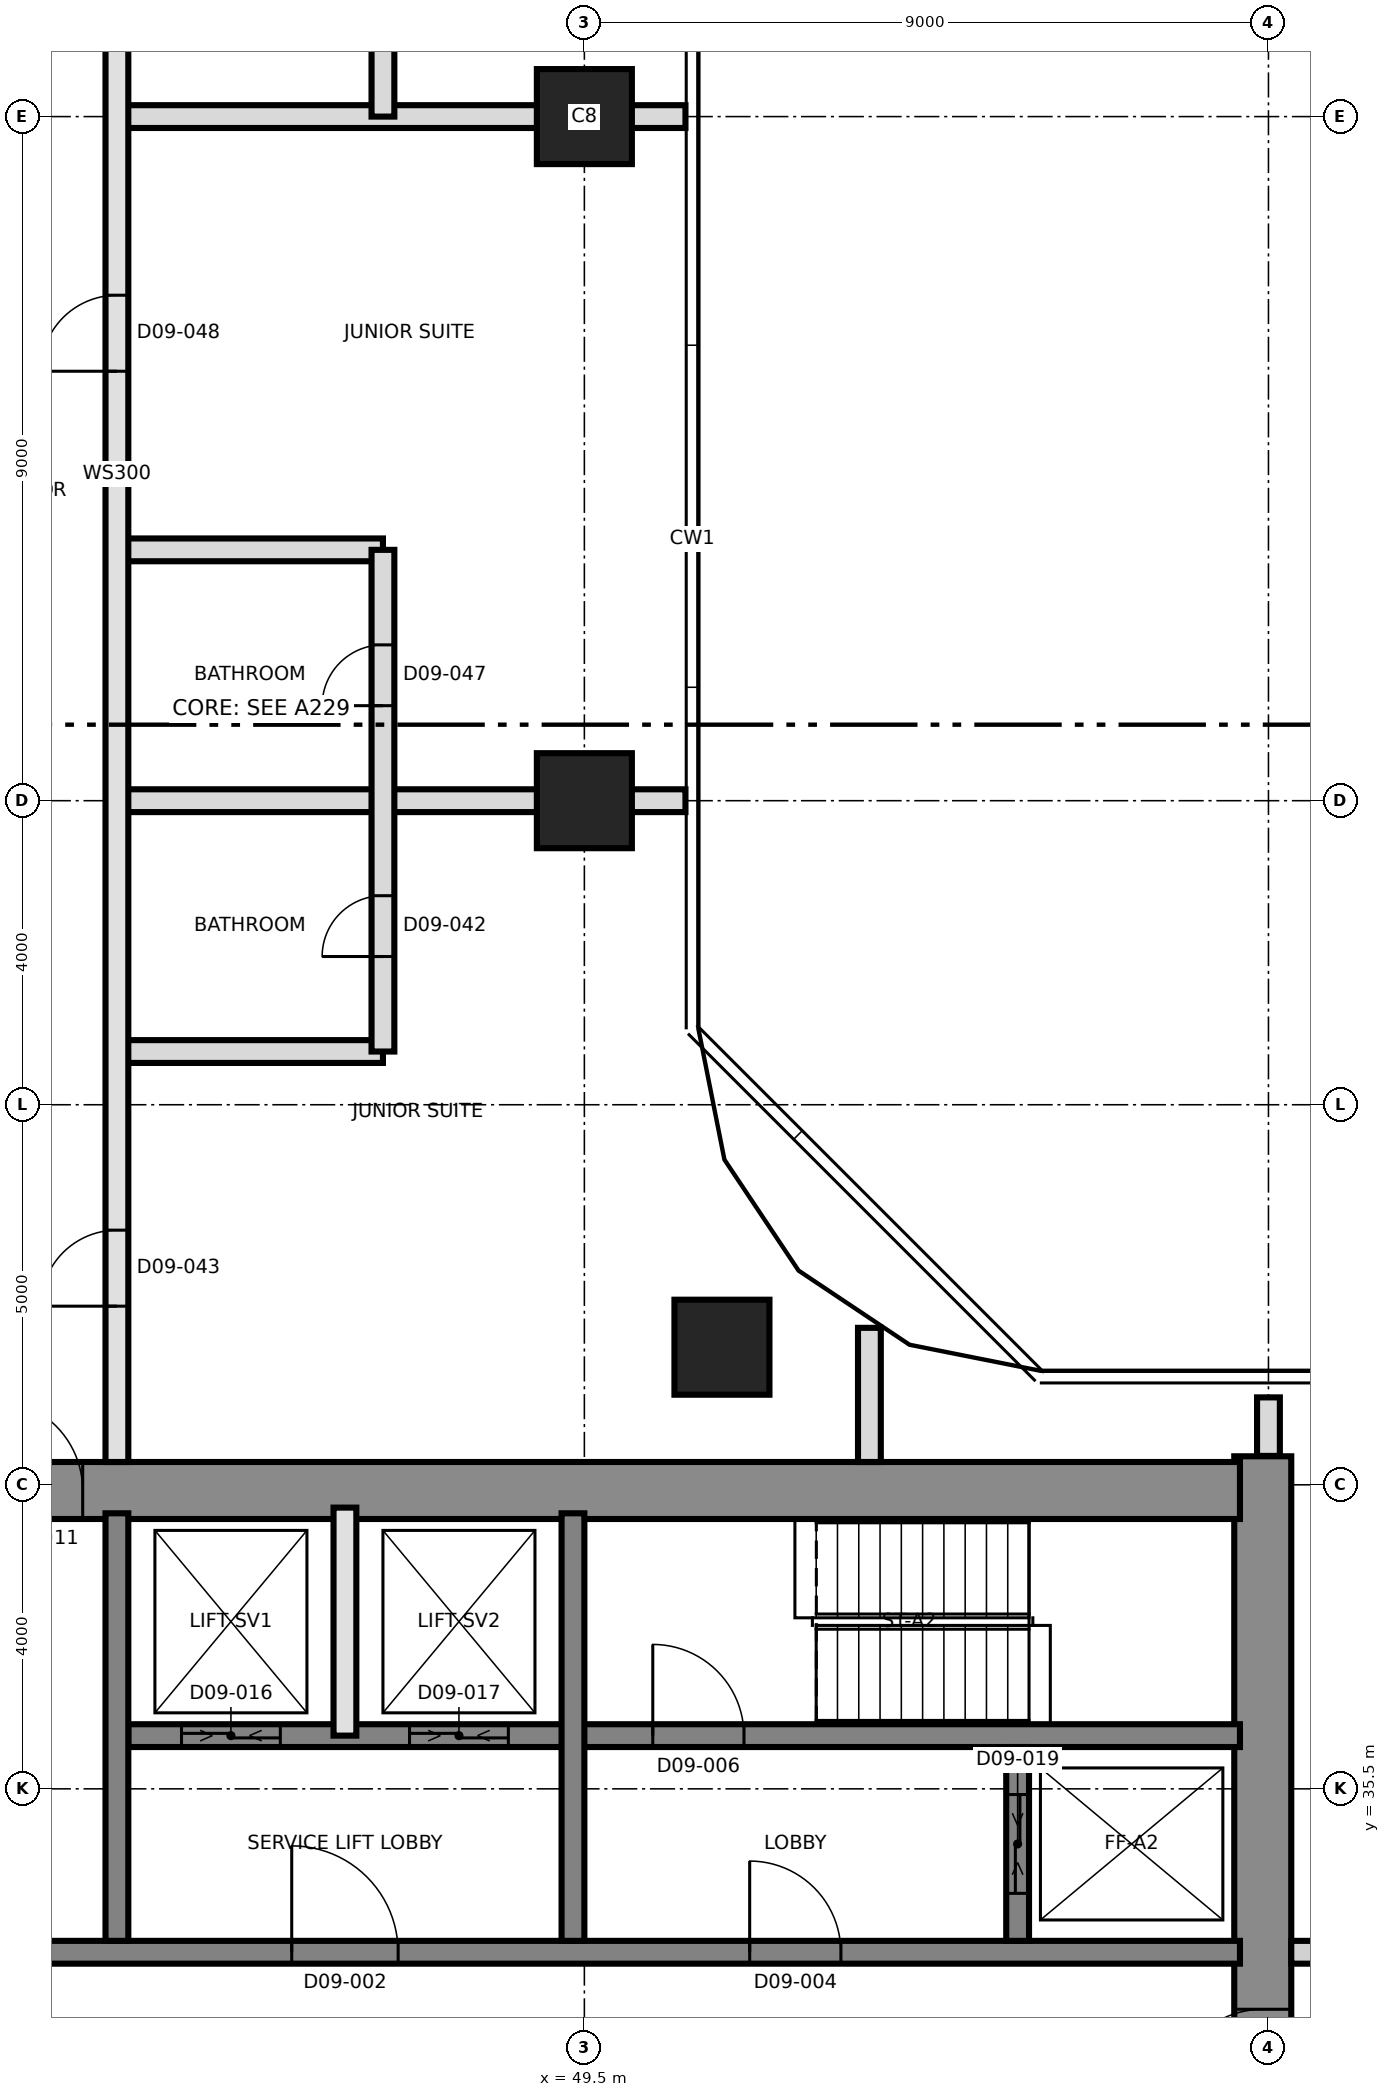
"""IFC4 building model, lengths in metres.
Left out: names, types, materials, properties, quantities, classifications, styles, units other than length and angle.
Written with IfcOpenShell. Run it as: python <this file> out.ifc"""

import sys

from ifc_helpers import new_model, si_unit, direction, frame, frame_2d, origin, origin_2d, place, context, subcontext, project, spatial, rectangle, extrude, element, fill, save


model = new_model("IFC4")
c1 = context("Model", 3, precision=1e-05, world=origin(), true_north=direction((0.0, 1.0)))
c2 = subcontext(c1, "Body", "Model", "MODEL_VIEW")
j1 = project(units=[si_unit("LENGTHUNIT", "METRE"), si_unit("PLANEANGLEUNIT", "RADIAN")], contexts=[c1])
p1 = place(None, origin())
s1 = spatial("IfcSite", under=j1, at=p1, CompositionType="ELEMENT")
p2 = place(p1, origin())
s2 = spatial("IfcBuilding", under=s1, at=p2, CompositionType="ELEMENT")
p3 = place(p2, frame((0.0, 0.0, 109.3)))
s3 = spatial("IfcBuildingStorey", under=s2, at=p3, CompositionType="ELEMENT", Elevation=109.3)
p4 = place(p3, frame((58.425, 21.125, 0.0), z_axis=(0.0, 0.0, 1.0), x_axis=(0.0, 1.0, 0.0)))
e1 = element("IfcWall", 1, at=p4, inside=s3, PredefinedType="SHEAR", context=c2, shape_type="SweptSolid", body=[
    extrude(rectangle(XDim=18.75, YDim=0.75, at=frame_2d((9.375, 0.0))), origin(), (0.0, 0.0, 1.0), 3.7),
])
p5 = place(p4, frame((10.275, 0.0, 0.0)))
e2 = element("IfcOpeningElement", 2, at=p5, cuts=e1, PredefinedType="OPENING", context=c2, shape_type="SweptSolid", body=[
    extrude(rectangle(XDim=1.2, YDim=2.1, at=frame_2d((0.6, 1.05))), frame((0.0, 0.385, 0.0), z_axis=(0.0, -1.0, 0.0), x_axis=(1.0, 0.0, 0.0)), (0.0, 0.0, 1.0), 0.77),
])
p6 = place(p3, frame((31.125, 39.425, 0.0), z_axis=(0.0, 0.0, 1.0), x_axis=(1.0, 0.0, 0.0)))
e3 = element("IfcWall", 3, at=p6, inside=s3, PredefinedType="SHEAR", context=c2, shape_type="SweptSolid", body=[
    extrude(rectangle(XDim=27.0, YDim=0.75, at=frame_2d((13.5, 0.0))), origin(), (0.0, 0.0, 1.0), 3.7),
])
p7 = place(p6, frame((10.575, 0.0, 0.0)))
e4 = element("IfcOpeningElement", 4, at=p7, cuts=e3, PredefinedType="OPENING", context=c2, shape_type="SweptSolid", body=[
    extrude(rectangle(XDim=1.2, YDim=2.1, at=frame_2d((0.6, 1.05))), frame((0.0, 0.385, 0.0), z_axis=(0.0, -1.0, 0.0), x_axis=(1.0, 0.0, 0.0)), (0.0, 0.0, 1.0), 0.77),
])
p8 = place(p3, frame((31.875, 33.35, 0.0), z_axis=(0.0, 0.0, 1.0), x_axis=(1.0, 0.0, 0.0)))
e5 = element("IfcWall", 5, at=p8, inside=s3, PredefinedType="SHEAR", context=c2, shape_type="SweptSolid", body=[
    extrude(rectangle(XDim=26.25, YDim=0.3, at=frame_2d((13.125, 0.0))), origin(), (0.0, 0.0, 1.0), 3.7),
])
p9 = place(p8, frame((13.775, 0.0, 0.0)))
e6 = element("IfcOpeningElement", 6, at=p9, cuts=e5, PredefinedType="OPENING", context=c2, shape_type="SweptSolid", body=[
    extrude(rectangle(XDim=1.4, YDim=2.1, at=frame_2d((0.7, 1.05))), frame((0.0, 0.16, 0.0), z_axis=(0.0, -1.0, 0.0), x_axis=(1.0, 0.0, 0.0)), (0.0, 0.0, 1.0), 0.32),
])
p10 = place(p8, frame((5.25, 0.0, 0.0)))
e7 = element("IfcOpeningElement", 7, at=p10, cuts=e5, PredefinedType="OPENING", context=c2, shape_type="SweptSolid", body=[
    extrude(rectangle(XDim=1.2, YDim=2.1, at=frame_2d((0.6, 1.05))), frame((0.0, 0.16, 0.0), z_axis=(0.0, -1.0, 0.0), x_axis=(1.0, 0.0, 0.0)), (0.0, 0.0, 1.0), 0.32),
])
p11 = place(p8, frame((19.8, 0.0, 0.0)))
e8 = element("IfcOpeningElement", 8, at=p11, cuts=e5, PredefinedType="OPENING", context=c2, shape_type="SweptSolid", body=[
    extrude(rectangle(XDim=1.2, YDim=2.1, at=frame_2d((0.6, 1.05))), frame((0.0, 0.16, 0.0), z_axis=(0.0, -1.0, 0.0), x_axis=(1.0, 0.0, 0.0)), (0.0, 0.0, 1.0), 0.32),
])
p12 = place(p3, frame((43.5, 36.2, 0.0), z_axis=(0.0, 0.0, 1.0), x_axis=(1.0, 0.0, 0.0)))
e9 = element("IfcWall", 9, at=p12, inside=s3, PredefinedType="SHEAR", context=c2, shape_type="SweptSolid", body=[
    extrude(rectangle(XDim=14.625, YDim=0.3, at=frame_2d((7.312, 0.0))), origin(), (0.0, 0.0, 1.0), 3.7),
])
p13 = place(p12, frame((6.9, 0.0, 0.0)))
e10 = element("IfcOpeningElement", 10, at=p13, cuts=e9, PredefinedType="OPENING", context=c2, shape_type="SweptSolid", body=[
    extrude(rectangle(XDim=1.2, YDim=2.1, at=frame_2d((0.6, 1.05))), frame((0.0, 0.16, 0.0), z_axis=(0.0, -1.0, 0.0), x_axis=(1.0, 0.0, 0.0)), (0.0, 0.0, 1.0), 0.32),
])
p14 = place(p12, frame((0.7, 0.0, 0.0)))
e11 = element("IfcOpeningElement", 11, at=p14, cuts=e9, PredefinedType="OPENING", context=c2, shape_type="SweptSolid", body=[
    extrude(rectangle(XDim=1.3, YDim=2.4, at=frame_2d((0.65, 1.2))), frame((0.0, 0.16, 0.0), z_axis=(0.0, -1.0, 0.0), x_axis=(1.0, 0.0, 0.0)), (0.0, 0.0, 1.0), 0.32),
])
p15 = place(p12, frame((3.7, 0.0, 0.0)))
e12 = element("IfcOpeningElement", 12, at=p15, cuts=e9, PredefinedType="OPENING", context=c2, shape_type="SweptSolid", body=[
    extrude(rectangle(XDim=1.3, YDim=2.4, at=frame_2d((0.65, 1.2))), frame((0.0, 0.16, 0.0), z_axis=(0.0, -1.0, 0.0), x_axis=(1.0, 0.0, 0.0)), (0.0, 0.0, 1.0), 0.32),
])
for number, where, z_axis, x_axis in (
    (13, (43.35, 33.5, 0.0), (0.0, 0.0, 1.0), (0.0, 1.0, 0.0)),
    (14, (49.35, 33.5, 0.0), (0.0, 0.0, 1.0), (0.0, 1.0, 0.0)),
):
    element("IfcWall", number, at=place(p3, frame(where, z_axis=z_axis, x_axis=x_axis)), inside=s3, PredefinedType="SHEAR", context=c2, shape_type="SweptSolid", body=[
        extrude(rectangle(XDim=5.625, YDim=0.3, at=frame_2d((2.812, 0.0))), origin(), (0.0, 0.0, 1.0), 3.7),
    ])
p16 = place(p3, frame((55.2, 33.5, 0.0), z_axis=(0.0, 0.0, 1.0), x_axis=(0.0, 1.0, 0.0)))
e15 = element("IfcWall", 15, at=p16, inside=s3, PredefinedType="SHEAR", context=c2, shape_type="SweptSolid", body=[
    extrude(rectangle(XDim=2.55, YDim=0.3, at=frame_2d((1.275, 0.0))), origin(), (0.0, 0.0, 1.0), 3.7),
])
p17 = place(p16, frame((0.625, 0.0, 0.0)))
e16 = element("IfcOpeningElement", 16, at=p17, cuts=e15, PredefinedType="OPENING", context=c2, shape_type="SweptSolid", body=[
    extrude(rectangle(XDim=1.3, YDim=2.4, at=frame_2d((0.65, 1.2))), frame((0.0, 0.16, 0.0), z_axis=(0.0, -1.0, 0.0), x_axis=(1.0, 0.0, 0.0)), (0.0, 0.0, 1.0), 0.32),
])
for number, where, z_axis, x_axis in (
    (17, (51.31, 41.31, 0.0), (0.0, 0.0, 1.0), (1.0, 0.0, 0.0)),
    (18, (49.5, 48.5, 0.0), (0.0, 0.0, 1.0), (1.0, 0.0, 0.0)),
    (19, (49.5, 57.5, 0.0), (0.0, 0.0, 1.0), (1.0, 0.0, 0.0)),
):
    element("IfcColumn", number, at=place(p3, frame(where, z_axis=z_axis, x_axis=x_axis)), inside=s3, PredefinedType="COLUMN", context=c2, shape_type="SweptSolid", body=[
        extrude(rectangle(XDim=1.25, YDim=1.25, at=origin_2d()), origin(), (0.0, 0.0, 1.0), 3.7),
    ])
p18 = place(p3, frame((46.35, 36.2, 0.0), z_axis=(0.0, 0.0, 1.0), x_axis=(0.0, 1.0, 0.0)))
e20 = element("IfcWall", 20, at=p18, inside=s3, PredefinedType="SOLIDWALL", context=c2, shape_type="SweptSolid", body=[
    extrude(rectangle(XDim=3.0, YDim=0.3, at=frame_2d((1.5, 0.0))), origin(), (0.0, 0.0, 1.0), 3.4),
])
p19 = place(p3, frame((58.8, 33.35, 0.0), z_axis=(0.0, 0.0, 1.0), x_axis=(1.0, 0.0, 0.0)))
e21 = element("IfcWall", 21, at=p19, inside=s3, PredefinedType="PARTITIONING", context=c2, shape_type="SweptSolid", body=[
    extrude(rectangle(XDim=26.53, YDim=0.3, at=frame_2d((13.265, 0.0))), origin(), (0.0, 0.0, 1.0), 3.4),
])
p20 = place(p19, frame((2.05, 0.0, 0.0)))
e22 = element("IfcOpeningElement", 22, at=p20, cuts=e21, PredefinedType="OPENING", context=c2, shape_type="SweptSolid", body=[
    extrude(rectangle(XDim=1.0, YDim=2.4, at=frame_2d((0.5, 1.2))), frame((0.0, 0.16, 0.0), z_axis=(0.0, -1.0, 0.0), x_axis=(1.0, 0.0, 0.0)), (0.0, 0.0, 1.0), 0.32),
])
p21 = place(p19, frame((11.95, 0.0, 0.0)))
e23 = element("IfcOpeningElement", 23, at=p21, cuts=e21, PredefinedType="OPENING", context=c2, shape_type="SweptSolid", body=[
    extrude(rectangle(XDim=1.0, YDim=2.1, at=frame_2d((0.5, 1.05))), frame((0.0, 0.16, 0.0), z_axis=(0.0, -1.0, 0.0), x_axis=(1.0, 0.0, 0.0)), (0.0, 0.0, 1.0), 0.32),
])
p22 = place(p19, frame((13.6, 0.0, 0.0)))
e24 = element("IfcOpeningElement", 24, at=p22, cuts=e21, PredefinedType="OPENING", context=c2, shape_type="SweptSolid", body=[
    extrude(rectangle(XDim=1.0, YDim=2.1, at=frame_2d((0.5, 1.05))), frame((0.0, 0.16, 0.0), z_axis=(0.0, -1.0, 0.0), x_axis=(1.0, 0.0, 0.0)), (0.0, 0.0, 1.0), 0.32),
])
p23 = place(p19, frame((21.7, 0.0, 0.0)))
e25 = element("IfcOpeningElement", 25, at=p23, cuts=e21, PredefinedType="OPENING", context=c2, shape_type="SweptSolid", body=[
    extrude(rectangle(XDim=1.0, YDim=2.4, at=frame_2d((0.5, 1.2))), frame((0.0, 0.16, 0.0), z_axis=(0.0, -1.0, 0.0), x_axis=(1.0, 0.0, 0.0)), (0.0, 0.0, 1.0), 0.32),
])
p24 = place(p3, frame((43.35, 45.2, 0.0), z_axis=(0.0, 0.0, 1.0), x_axis=(1.0, 0.0, 0.0)))
e26 = element("IfcWall", 26, at=p24, inside=s3, PredefinedType="PARTITIONING", context=c2, shape_type="SweptSolid", body=[
    extrude(rectangle(XDim=3.5, YDim=0.3, at=frame_2d((1.75, 0.0))), origin(), (0.0, 0.0, 1.0), 3.4),
])
p25 = place(p3, frame((43.35, 48.5, 0.0), z_axis=(0.0, 0.0, 1.0), x_axis=(1.0, 0.0, 0.0)))
e27 = element("IfcWall", 27, at=p25, inside=s3, PredefinedType="PARTITIONING", context=c2, shape_type="SweptSolid", body=[
    extrude(rectangle(XDim=7.48, YDim=0.3, at=frame_2d((3.74, 0.0))), origin(), (0.0, 0.0, 1.0), 3.4),
])
p26 = place(p3, frame((43.35, 51.8, 0.0), z_axis=(0.0, 0.0, 1.0), x_axis=(1.0, 0.0, 0.0)))
e28 = element("IfcWall", 28, at=p26, inside=s3, PredefinedType="PARTITIONING", context=c2, shape_type="SweptSolid", body=[
    extrude(rectangle(XDim=3.5, YDim=0.3, at=frame_2d((1.75, 0.0))), origin(), (0.0, 0.0, 1.0), 3.4),
])
p27 = place(p3, frame((43.35, 57.5, 0.0), z_axis=(0.0, 0.0, 1.0), x_axis=(1.0, 0.0, 0.0)))
e29 = element("IfcWall", 29, at=p27, inside=s3, PredefinedType="PARTITIONING", context=c2, shape_type="SweptSolid", body=[
    extrude(rectangle(XDim=7.48, YDim=0.3, at=frame_2d((3.74, 0.0))), origin(), (0.0, 0.0, 1.0), 3.4),
])
p28 = place(p3, frame((43.35, 39.8, 0.0), z_axis=(0.0, 0.0, 1.0), x_axis=(0.0, 1.0, 0.0)))
e30 = element("IfcWall", 30, at=p28, inside=s3, PredefinedType="SOLIDWALL", context=c2, shape_type="SweptSolid", body=[
    extrude(rectangle(XDim=26.0, YDim=0.3, at=frame_2d((13.0, 0.0))), origin(), (0.0, 0.0, 1.0), 3.4),
])
p29 = place(p28, frame((2.05, 0.0, 0.0)))
e31 = element("IfcOpeningElement", 31, at=p29, cuts=e30, PredefinedType="OPENING", context=c2, shape_type="SweptSolid", body=[
    extrude(rectangle(XDim=1.0, YDim=2.4, at=frame_2d((0.5, 1.2))), frame((0.0, 0.16, 0.0), z_axis=(0.0, -1.0, 0.0), x_axis=(1.0, 0.0, 0.0)), (0.0, 0.0, 1.0), 0.32),
])
p30 = place(p28, frame((14.35, 0.0, 0.0)))
e32 = element("IfcOpeningElement", 32, at=p30, cuts=e30, PredefinedType="OPENING", context=c2, shape_type="SweptSolid", body=[
    extrude(rectangle(XDim=1.0, YDim=2.4, at=frame_2d((0.5, 1.2))), frame((0.0, 0.16, 0.0), z_axis=(0.0, -1.0, 0.0), x_axis=(1.0, 0.0, 0.0)), (0.0, 0.0, 1.0), 0.32),
])
p31 = place(p28, frame((21.25, 0.0, 0.0)))
e33 = element("IfcOpeningElement", 33, at=p31, cuts=e30, PredefinedType="OPENING", context=c2, shape_type="SweptSolid", body=[
    extrude(rectangle(XDim=1.0, YDim=2.4, at=frame_2d((0.5, 1.2))), frame((0.0, 0.16, 0.0), z_axis=(0.0, -1.0, 0.0), x_axis=(1.0, 0.0, 0.0)), (0.0, 0.0, 1.0), 0.32),
])
p32 = place(p3, frame((46.85, 45.2, 0.0), z_axis=(0.0, 0.0, 1.0), x_axis=(0.0, 1.0, 0.0)))
e34 = element("IfcWall", 34, at=p32, inside=s3, PredefinedType="PARTITIONING", context=c2, shape_type="SweptSolid", body=[
    extrude(rectangle(XDim=6.6, YDim=0.3, at=frame_2d((3.3, 0.0))), origin(), (0.0, 0.0, 1.0), 3.4),
])
p33 = place(p32, frame((1.25, 0.0, 0.0)))
e35 = element("IfcOpeningElement", 35, at=p33, cuts=e34, PredefinedType="OPENING", context=c2, shape_type="SweptSolid", body=[
    extrude(rectangle(XDim=0.8, YDim=2.1, at=frame_2d((0.4, 1.05))), frame((0.0, 0.16, 0.0), z_axis=(0.0, -1.0, 0.0), x_axis=(1.0, 0.0, 0.0)), (0.0, 0.0, 1.0), 0.32),
])
p34 = place(p32, frame((4.55, 0.0, 0.0)))
e36 = element("IfcOpeningElement", 36, at=p34, cuts=e34, PredefinedType="OPENING", context=c2, shape_type="SweptSolid", body=[
    extrude(rectangle(XDim=0.8, YDim=2.1, at=frame_2d((0.4, 1.05))), frame((0.0, 0.16, 0.0), z_axis=(0.0, -1.0, 0.0), x_axis=(1.0, 0.0, 0.0)), (0.0, 0.0, 1.0), 0.32),
])
p35 = place(p3, frame((46.85, 57.5, 0.0), z_axis=(0.0, 0.0, 1.0), x_axis=(0.0, 1.0, 0.0)))
e37 = element("IfcWall", 37, at=p35, inside=s3, PredefinedType="PARTITIONING", context=c2, shape_type="SweptSolid", body=[
    extrude(rectangle(XDim=3.3, YDim=0.3, at=frame_2d((1.65, 0.0))), origin(), (0.0, 0.0, 1.0), 3.4),
])
p36 = place(p35, frame((1.25, 0.0, 0.0)))
e38 = element("IfcOpeningElement", 38, at=p36, cuts=e37, PredefinedType="OPENING", context=c2, shape_type="SweptSolid", body=[
    extrude(rectangle(XDim=0.8, YDim=2.1, at=frame_2d((0.4, 1.05))), frame((0.0, 0.16, 0.0), z_axis=(0.0, -1.0, 0.0), x_axis=(1.0, 0.0, 0.0)), (0.0, 0.0, 1.0), 0.32),
])
p37 = place(p3, frame((53.25, 39.8, 0.0), z_axis=(0.0, 0.0, 1.0), x_axis=(0.0, 1.0, 0.0)))
e39 = element("IfcWall", 39, at=p37, inside=s3, PredefinedType="PARTITIONING", context=c2, shape_type="SweptSolid", body=[
    extrude(rectangle(XDim=1.765, YDim=0.3, at=frame_2d((0.882, 0.0))), origin(), (0.0, 0.0, 1.0), 3.4),
])
p38 = place(p3, frame((58.5, 39.88, 0.0), z_axis=(0.0, 0.0, 1.0), x_axis=(0.0, 1.0, 0.0)))
e40 = element("IfcWall", 40, at=p38, inside=s3, PredefinedType="PARTITIONING", context=c2, shape_type="SweptSolid", body=[
    extrude(rectangle(XDim=0.77, YDim=0.3, at=frame_2d((0.385, 0.0))), origin(), (0.0, 0.0, 1.0), 3.4),
])
p39 = place(p9, origin())
e41 = element("IfcDoor", 41, at=p39, inside=s3, OperationType="SINGLE_SWING_RIGHT", PredefinedType="DOOR", context=c2, shape_type="SweptSolid", body=[
    extrude(rectangle(XDim=1.4, YDim=2.1, at=frame_2d((0.7, 1.05))), frame((0.0, 0.025, 0.0), z_axis=(0.0, -1.0, 0.0), x_axis=(1.0, 0.0, 0.0)), (0.0, 0.0, 1.0), 0.05),
])
fill(e6, e41)
p40 = place(p11, origin())
e42 = element("IfcDoor", 42, at=p40, inside=s3, OperationType="SINGLE_SWING_RIGHT", PredefinedType="DOOR", context=c2, shape_type="SweptSolid", body=[
    extrude(rectangle(XDim=1.2, YDim=2.1, at=frame_2d((0.6, 1.05))), frame((0.0, 0.025, 0.0), z_axis=(0.0, -1.0, 0.0), x_axis=(1.0, 0.0, 0.0)), (0.0, 0.0, 1.0), 0.05),
])
fill(e8, e42)
p41 = place(p13, origin())
e43 = element("IfcDoor", 43, at=p41, inside=s3, OperationType="SINGLE_SWING_LEFT", PredefinedType="DOOR", context=c2, shape_type="SweptSolid", body=[
    extrude(rectangle(XDim=1.2, YDim=2.1, at=frame_2d((0.6, 1.05))), frame((0.0, 0.025, 0.0), z_axis=(0.0, -1.0, 0.0), x_axis=(1.0, 0.0, 0.0)), (0.0, 0.0, 1.0), 0.05),
])
fill(e10, e43)
p42 = place(p5, origin())
e44 = element("IfcDoor", 44, at=p42, inside=s3, OperationType="SINGLE_SWING_LEFT", PredefinedType="DOOR", context=c2, shape_type="SweptSolid", body=[
    extrude(rectangle(XDim=1.2, YDim=2.1, at=frame_2d((0.6, 1.05))), frame((0.0, 0.025, 0.0), z_axis=(0.0, -1.0, 0.0), x_axis=(1.0, 0.0, 0.0)), (0.0, 0.0, 1.0), 0.05),
])
fill(e2, e44)
p43 = place(p7, origin())
e45 = element("IfcDoor", 45, at=p43, inside=s3, OperationType="SINGLE_SWING_RIGHT", PredefinedType="DOOR", context=c2, shape_type="SweptSolid", body=[
    extrude(rectangle(XDim=1.2, YDim=2.1, at=frame_2d((0.6, 1.05))), frame((0.0, 0.025, 0.0), z_axis=(0.0, -1.0, 0.0), x_axis=(1.0, 0.0, 0.0)), (0.0, 0.0, 1.0), 0.05),
])
fill(e4, e45)
p44 = place(p14, origin())
e46 = element("IfcDoor", 46, at=p44, inside=s3, OperationType="SLIDING_TO_LEFT", PredefinedType="DOOR", context=c2, shape_type="SweptSolid", body=[
    extrude(rectangle(XDim=1.3, YDim=2.4, at=frame_2d((0.65, 1.2))), frame((0.0, 0.025, 0.0), z_axis=(0.0, -1.0, 0.0), x_axis=(1.0, 0.0, 0.0)), (0.0, 0.0, 1.0), 0.05),
])
fill(e11, e46)
p45 = place(p15, origin())
e47 = element("IfcDoor", 47, at=p45, inside=s3, OperationType="SLIDING_TO_LEFT", PredefinedType="DOOR", context=c2, shape_type="SweptSolid", body=[
    extrude(rectangle(XDim=1.3, YDim=2.4, at=frame_2d((0.65, 1.2))), frame((0.0, 0.025, 0.0), z_axis=(0.0, -1.0, 0.0), x_axis=(1.0, 0.0, 0.0)), (0.0, 0.0, 1.0), 0.05),
])
fill(e12, e47)
p46 = place(p17, origin())
e48 = element("IfcDoor", 48, at=p46, inside=s3, OperationType="SLIDING_TO_LEFT", PredefinedType="DOOR", context=c2, shape_type="SweptSolid", body=[
    extrude(rectangle(XDim=1.3, YDim=2.4, at=frame_2d((0.65, 1.2))), frame((0.0, 0.025, 0.0), z_axis=(0.0, -1.0, 0.0), x_axis=(1.0, 0.0, 0.0)), (0.0, 0.0, 1.0), 0.05),
])
fill(e16, e48)
p47 = place(p33, origin())
e49 = element("IfcDoor", 49, at=p47, inside=s3, OperationType="SINGLE_SWING_LEFT", PredefinedType="DOOR", context=c2, shape_type="SweptSolid", body=[
    extrude(rectangle(XDim=0.8, YDim=2.1, at=frame_2d((0.4, 1.05))), frame((0.0, 0.025, 0.0), z_axis=(0.0, -1.0, 0.0), x_axis=(1.0, 0.0, 0.0)), (0.0, 0.0, 1.0), 0.05),
])
fill(e35, e49)
p48 = place(p29, origin())
e50 = element("IfcDoor", 50, at=p48, inside=s3, OperationType="SINGLE_SWING_LEFT", PredefinedType="DOOR", context=c2, shape_type="SweptSolid", body=[
    extrude(rectangle(XDim=1.0, YDim=2.4, at=frame_2d((0.5, 1.2))), frame((0.0, 0.025, 0.0), z_axis=(0.0, -1.0, 0.0), x_axis=(1.0, 0.0, 0.0)), (0.0, 0.0, 1.0), 0.05),
])
fill(e31, e50)
p49 = place(p34, origin())
e51 = element("IfcDoor", 51, at=p49, inside=s3, OperationType="SINGLE_SWING_LEFT", PredefinedType="DOOR", context=c2, shape_type="SweptSolid", body=[
    extrude(rectangle(XDim=0.8, YDim=2.1, at=frame_2d((0.4, 1.05))), frame((0.0, 0.025, 0.0), z_axis=(0.0, -1.0, 0.0), x_axis=(1.0, 0.0, 0.0)), (0.0, 0.0, 1.0), 0.05),
])
fill(e36, e51)
p50 = place(p30, origin())
e52 = element("IfcDoor", 52, at=p50, inside=s3, OperationType="SINGLE_SWING_RIGHT", PredefinedType="DOOR", context=c2, shape_type="SweptSolid", body=[
    extrude(rectangle(XDim=1.0, YDim=2.4, at=frame_2d((0.5, 1.2))), frame((0.0, 0.025, 0.0), z_axis=(0.0, -1.0, 0.0), x_axis=(1.0, 0.0, 0.0)), (0.0, 0.0, 1.0), 0.05),
])
fill(e32, e52)
save(model, sys.argv[1])
